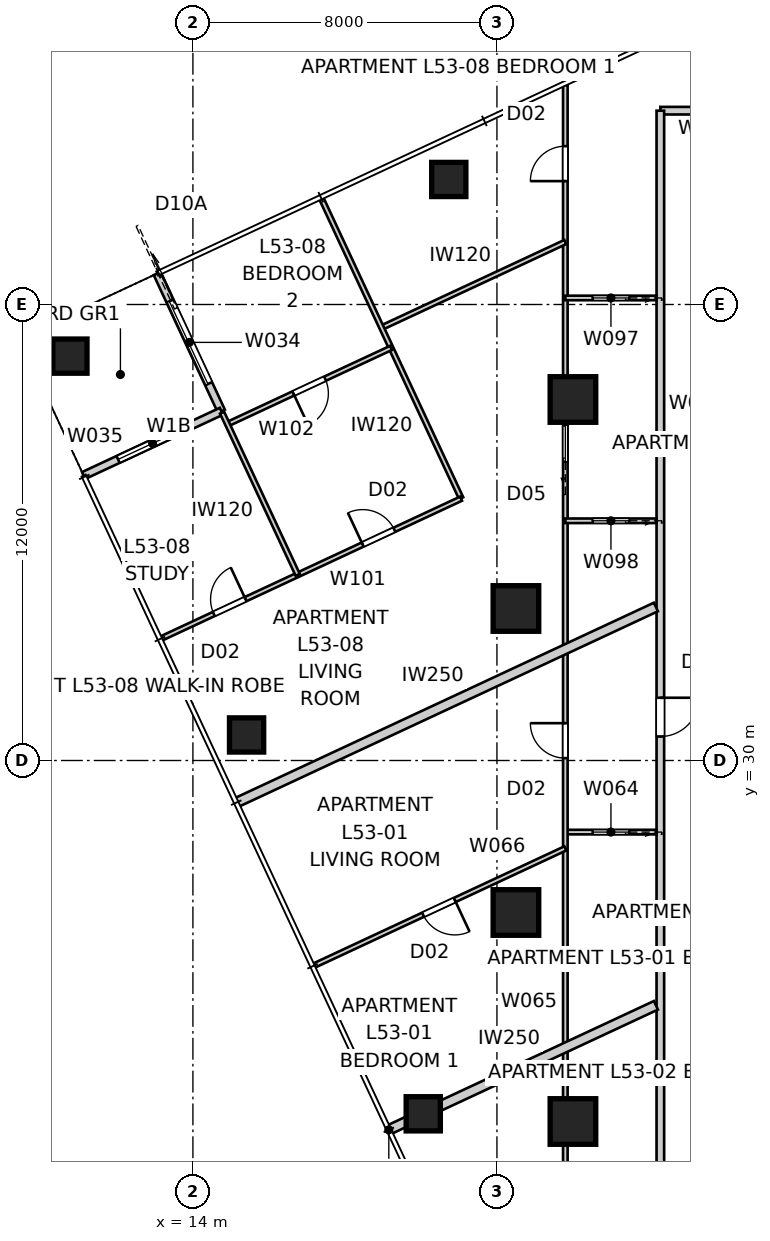
"""IFC4 building model, lengths in metres.
Left out: names, types, materials, properties, quantities, classifications, styles, units other than length and angle.
Written with IfcOpenShell. Run it as: python <this file> out.ifc"""

import sys

from ifc_helpers import new_model, si_unit, direction, frame, frame_2d, origin, origin_2d, place, context, subcontext, project, spatial, rectangle, extrude, element, fill, save


model = new_model("IFC4")
c1 = context("Model", 3, precision=1e-05, world=origin(), true_north=direction((0.0, 1.0)))
c2 = subcontext(c1, "Body", "Model", "MODEL_VIEW")
j1 = project(units=[si_unit("LENGTHUNIT", "METRE"), si_unit("PLANEANGLEUNIT", "RADIAN")], contexts=[c1])
p1 = place(None, origin())
s1 = spatial("IfcSite", under=j1, at=p1, CompositionType="ELEMENT")
p2 = place(p1, origin())
s2 = spatial("IfcBuilding", under=s1, at=p2, CompositionType="ELEMENT")
p3 = place(p2, frame((0.0, 0.0, 193.0)))
s3 = spatial("IfcBuildingStorey", under=s2, at=p3, CompositionType="ELEMENT", Elevation=193.0)
for number, where, z_axis, x_axis in (
    (1, (20.733, 45.29, 0.0), (0.0, 0.0, 1.0), (1.0, 0.0, 0.0)),
    (2, (10.764, 40.641, 0.0), (0.0, 0.0, 1.0), (1.0, 0.0, 0.0)),
    (3, (15.412, 30.672, 0.0), (0.0, 0.0, 1.0), (1.0, 0.0, 0.0)),
    (4, (20.061, 20.702, 0.0), (0.0, 0.0, 1.0), (1.0, 0.0, 0.0)),
):
    element("IfcColumn", number, at=place(p3, frame(where, z_axis=z_axis, x_axis=x_axis)), inside=s3, PredefinedType="COLUMN", context=c2, shape_type="SweptSolid", body=[
        extrude(rectangle(XDim=0.9, YDim=0.9, at=origin_2d()), origin(), (0.0, 0.0, 1.0), 3.4),
    ])
for number, where, z_axis, x_axis in (
    (5, (24.0, 39.5, 0.0), (0.0, 0.0, 1.0), (1.0, 0.0, 0.0)),
    (6, (22.5, 34.0, 0.0), (0.0, 0.0, 1.0), (1.0, 0.0, 0.0)),
    (7, (22.5, 26.0, 0.0), (0.0, 0.0, 1.0), (1.0, 0.0, 0.0)),
    (8, (24.0, 20.5, 0.0), (0.0, 0.0, 1.0), (1.0, 0.0, 0.0)),
):
    element("IfcColumn", number, at=place(p3, frame(where, z_axis=z_axis, x_axis=x_axis)), inside=s3, PredefinedType="COLUMN", context=c2, shape_type="SweptSolid", body=[
        extrude(rectangle(XDim=1.2, YDim=1.2, at=origin_2d()), origin(), (0.0, 0.0, 1.0), 3.4),
    ])
p4 = place(p3, frame((13.06, 42.815, 0.0), z_axis=(0.0, 0.0, 1.0), x_axis=(0.422658246362, -0.906289140828, 0.0)))
e9 = element("IfcWall", 9, at=p4, inside=s3, PredefinedType="SOLIDWALL", context=c2, shape_type="SweptSolid", body=[
    extrude(rectangle(XDim=4.0, YDim=0.2, at=frame_2d((2.0, 0.0))), origin(), (0.0, 0.0, 1.0), 3.25),
])
p5 = place(p4, frame((0.8, 0.0, 0.0)))
e10 = element("IfcOpeningElement", 10, at=p5, cuts=e9, PredefinedType="OPENING", context=c2, shape_type="SweptSolid", body=[
    extrude(rectangle(XDim=2.4, YDim=2.1, at=frame_2d((1.2, 1.05))), frame((0.0, 0.11, 0.0), z_axis=(0.0, -1.0, 0.0), x_axis=(1.0, 0.0, 0.0)), (0.0, 0.0, 1.0), 0.22),
])
p6 = place(p3, frame((14.75, 39.19, 0.0), z_axis=(0.0, 0.0, 1.0), x_axis=(-0.906289140828, -0.422658246362, 0.0)))
e11 = element("IfcWall", 11, at=p6, inside=s3, PredefinedType="SOLIDWALL", context=c2, shape_type="SweptSolid", body=[
    extrude(rectangle(XDim=4.0, YDim=0.2, at=frame_2d((2.0, 0.0))), origin(), (0.0, 0.0, 1.0), 3.25),
])
p7 = place(p6, frame((1.0, 0.0, 0.45)))
e12 = element("IfcOpeningElement", 12, at=p7, cuts=e11, PredefinedType="OPENING", context=c2, shape_type="SweptSolid", body=[
    extrude(rectangle(XDim=2.0, YDim=1.8, at=frame_2d((1.0, 0.9))), frame((0.0, 0.11, 0.0), z_axis=(0.0, -1.0, 0.0), x_axis=(1.0, 0.0, 0.0)), (0.0, 0.0, 1.0), 0.22),
])
p8 = place(p3, frame((33.692, 47.1, 0.0), z_axis=(0.0, 0.0, 1.0), x_axis=(-1.0, 0.0, 0.0)))
e13 = element("IfcWall", 13, at=p8, inside=s3, PredefinedType="PARTITIONING", context=c2, shape_type="SweptSolid", body=[
    extrude(rectangle(XDim=7.392, YDim=0.2, at=frame_2d((3.696, 0.0))), origin(), (0.0, 0.0, 1.0), 3.25),
])
p9 = place(p8, frame((3.957, 0.0, 0.0)))
e14 = element("IfcOpeningElement", 14, at=p9, cuts=e13, PredefinedType="OPENING", context=c2, shape_type="SweptSolid", body=[
    extrude(rectangle(XDim=1.02, YDim=2.34, at=frame_2d((0.51, 1.17))), frame((0.0, 0.11, 0.0), z_axis=(0.0, -1.0, 0.0), x_axis=(1.0, 0.0, 0.0)), (0.0, 0.0, 1.0), 0.22),
])
p10 = place(p3, frame((26.3, 47.1, 0.0), z_axis=(0.0, 0.0, 1.0), x_axis=(0.0, -1.0, 0.0)))
e15 = element("IfcWall", 15, at=p10, inside=s3, PredefinedType="PARTITIONING", context=c2, shape_type="SweptSolid", body=[
    extrude(rectangle(XDim=33.8, YDim=0.2, at=frame_2d((16.9, 0.0))), origin(), (0.0, 0.0, 1.0), 3.25),
])
p11 = place(p10, frame((15.449, 0.0, 0.0)))
e16 = element("IfcOpeningElement", 16, at=p11, cuts=e15, PredefinedType="OPENING", context=c2, shape_type="SweptSolid", body=[
    extrude(rectangle(XDim=1.02, YDim=2.34, at=frame_2d((0.51, 1.17))), frame((0.0, 0.11, 0.0), z_axis=(0.0, -1.0, 0.0), x_axis=(1.0, 0.0, 0.0)), (0.0, 0.0, 1.0), 0.22),
])
p12 = place(p10, frame((30.883, 0.0, 0.0)))
e17 = element("IfcOpeningElement", 17, at=p12, cuts=e15, PredefinedType="OPENING", context=c2, shape_type="SweptSolid", body=[
    extrude(rectangle(XDim=1.02, YDim=2.34, at=frame_2d((0.51, 1.17))), frame((0.0, 0.11, 0.0), z_axis=(0.0, -1.0, 0.0), x_axis=(1.0, 0.0, 0.0)), (0.0, 0.0, 1.0), 0.22),
])
p13 = place(p3, frame((19.155, 20.28, 0.0), z_axis=(0.0, 0.0, 1.0), x_axis=(0.906308569177, 0.422616584432, 0.0)))
e18 = element("IfcWall", 18, at=p13, inside=s3, PredefinedType="PARTITIONING", context=c2, shape_type="SweptSolid", body=[
    extrude(rectangle(XDim=7.755, YDim=0.25, at=frame_2d((3.877, 0.0))), origin(), (0.0, 0.0, 1.0), 3.25),
])
p14 = place(p3, frame((15.14, 28.89, 0.0), z_axis=(0.0, 0.0, 1.0), x_axis=(0.906303906082, 0.422626584374, 0.0)))
e19 = element("IfcWall", 19, at=p14, inside=s3, PredefinedType="PARTITIONING", context=c2, shape_type="SweptSolid", body=[
    extrude(rectangle(XDim=12.185, YDim=0.25, at=frame_2d((6.092, 0.0))), origin(), (0.0, 0.0, 1.0), 3.25),
])
p15 = place(p3, frame((26.2, 28.116, 0.0), z_axis=(0.0, 0.0, 1.0), x_axis=(-1.0, 0.0, 0.0)))
e20 = element("IfcWall", 20, at=p15, inside=s3, PredefinedType="PARTITIONING", context=c2, shape_type="SweptSolid", body=[
    extrude(rectangle(XDim=2.4, YDim=0.12, at=frame_2d((1.2, 0.0))), origin(), (0.0, 0.0, 1.0), 3.25),
])
p16 = place(p15, frame((0.72, 0.0, 0.0)))
e21 = element("IfcOpeningElement", 21, at=p16, cuts=e20, PredefinedType="OPENING", context=c2, shape_type="SweptSolid", body=[
    extrude(rectangle(XDim=0.96, YDim=2.1, at=frame_2d((0.48, 1.05))), frame((0.0, 0.07, 0.0), z_axis=(0.0, -1.0, 0.0), x_axis=(1.0, 0.0, 0.0)), (0.0, 0.0, 1.0), 0.14),
])
p17 = place(p3, frame((23.8, 17.205, 0.0), z_axis=(0.0, 0.0, 1.0), x_axis=(0.0, 1.0, 0.0)))
e22 = element("IfcWall", 22, at=p17, inside=s3, PredefinedType="PARTITIONING", context=c2, shape_type="SweptSolid", body=[
    extrude(rectangle(XDim=30.574, YDim=0.12, at=frame_2d((15.287, 0.0))), origin(), (0.0, 0.0, 1.0), 2.55),
])
p18 = place(p17, frame((12.857, 0.0, 0.0)))
e23 = element("IfcOpeningElement", 23, at=p18, cuts=e22, PredefinedType="OPENING", context=c2, shape_type="SweptSolid", body=[
    extrude(rectangle(XDim=0.92, YDim=2.34, at=frame_2d((0.46, 1.17))), frame((0.0, 0.07, 0.0), z_axis=(0.0, -1.0, 0.0), x_axis=(1.0, 0.0, 0.0)), (0.0, 0.0, 1.0), 0.14),
])
p19 = place(p17, frame((28.042, 0.0, 0.0)))
e24 = element("IfcOpeningElement", 24, at=p19, cuts=e22, PredefinedType="OPENING", context=c2, shape_type="SweptSolid", body=[
    extrude(rectangle(XDim=0.92, YDim=2.34, at=frame_2d((0.46, 1.17))), frame((0.0, 0.07, 0.0), z_axis=(0.0, -1.0, 0.0), x_axis=(1.0, 0.0, 0.0)), (0.0, 0.0, 1.0), 0.14),
])
p20 = place(p17, frame((20.655, 0.0, 0.0)))
e25 = element("IfcOpeningElement", 25, at=p20, cuts=e22, PredefinedType="OPENING", context=c2, shape_type="SweptSolid", body=[
    extrude(rectangle(XDim=0.96, YDim=2.1, at=frame_2d((0.48, 1.05))), frame((0.0, 0.07, 0.0), z_axis=(0.0, -1.0, 0.0), x_axis=(1.0, 0.0, 0.0)), (0.0, 0.0, 1.0), 0.14),
])
p21 = place(p3, frame((23.8, 27.687, 0.0), z_axis=(0.0, 0.0, 1.0), x_axis=(-0.906306986906, -0.422619977621, 0.0)))
e26 = element("IfcWall", 26, at=p21, inside=s3, PredefinedType="PARTITIONING", context=c2, shape_type="SweptSolid", body=[
    extrude(rectangle(XDim=7.3, YDim=0.12, at=frame_2d((3.65, 0.0))), origin(), (0.0, 0.0, 1.0), 3.25),
])
p22 = place(p21, frame((3.21, 0.0, 0.0)))
e27 = element("IfcOpeningElement", 27, at=p22, cuts=e26, PredefinedType="OPENING", context=c2, shape_type="SweptSolid", body=[
    extrude(rectangle(XDim=0.92, YDim=2.34, at=frame_2d((0.46, 1.17))), frame((0.0, 0.07, 0.0), z_axis=(0.0, -1.0, 0.0), x_axis=(1.0, 0.0, 0.0)), (0.0, 0.0, 1.0), 0.14),
])
p23 = place(p3, frame((26.2, 42.172, 0.0), z_axis=(0.0, 0.0, 1.0), x_axis=(-1.0, 0.0, 0.0)))
e28 = element("IfcWall", 28, at=p23, inside=s3, PredefinedType="PARTITIONING", context=c2, shape_type="SweptSolid", body=[
    extrude(rectangle(XDim=2.4, YDim=0.12, at=frame_2d((1.2, 0.0))), origin(), (0.0, 0.0, 1.0), 3.25),
])
p24 = place(p23, frame((0.72, 0.0, 0.0)))
e29 = element("IfcOpeningElement", 29, at=p24, cuts=e28, PredefinedType="OPENING", context=c2, shape_type="SweptSolid", body=[
    extrude(rectangle(XDim=0.96, YDim=2.1, at=frame_2d((0.48, 1.05))), frame((0.0, 0.07, 0.0), z_axis=(0.0, -1.0, 0.0), x_axis=(1.0, 0.0, 0.0)), (0.0, 0.0, 1.0), 0.14),
])
p25 = place(p3, frame((26.2, 36.308, 0.0), z_axis=(0.0, 0.0, 1.0), x_axis=(-1.0, 0.0, 0.0)))
e30 = element("IfcWall", 30, at=p25, inside=s3, PredefinedType="PARTITIONING", context=c2, shape_type="SweptSolid", body=[
    extrude(rectangle(XDim=2.4, YDim=0.12, at=frame_2d((1.2, 0.0))), origin(), (0.0, 0.0, 1.0), 3.25),
])
p26 = place(p25, frame((0.72, 0.0, 0.0)))
e31 = element("IfcOpeningElement", 31, at=p26, cuts=e30, PredefinedType="OPENING", context=c2, shape_type="SweptSolid", body=[
    extrude(rectangle(XDim=0.96, YDim=2.1, at=frame_2d((0.48, 1.05))), frame((0.0, 0.07, 0.0), z_axis=(0.0, -1.0, 0.0), x_axis=(1.0, 0.0, 0.0)), (0.0, 0.0, 1.0), 0.14),
])
p27 = place(p3, frame((18.965, 41.391, 0.0), z_axis=(0.0, 0.0, 1.0), x_axis=(0.906312880264, 0.422607339108, 0.0)))
e32 = element("IfcWall", 32, at=p27, inside=s3, PredefinedType="PARTITIONING", context=c2, shape_type="SweptSolid", body=[
    extrude(rectangle(XDim=5.334, YDim=0.12, at=frame_2d((2.667, 0.0))), origin(), (0.0, 0.0, 1.0), 3.25),
])
p28 = place(p3, frame((21.059, 36.902, 0.0), z_axis=(0.0, 0.0, 1.0), x_axis=(-0.422610460864, 0.906311424604, 0.0)))
e33 = element("IfcWall", 33, at=p28, inside=s3, PredefinedType="PARTITIONING", context=c2, shape_type="SweptSolid", body=[
    extrude(rectangle(XDim=8.7, YDim=0.12, at=frame_2d((4.35, 0.0))), origin(), (0.0, 0.0, 1.0), 3.25),
])
p29 = place(p3, frame((13.169, 33.211, 0.0), z_axis=(0.0, 0.0, 1.0), x_axis=(0.906281301188, 0.422675056181, 0.0)))
e34 = element("IfcWall", 34, at=p29, inside=s3, PredefinedType="PARTITIONING", context=c2, shape_type="SweptSolid", body=[
    extrude(rectangle(XDim=8.703, YDim=0.12, at=frame_2d((4.352, 0.0))), origin(), (0.0, 0.0, 1.0), 3.25),
])
p30 = place(p29, frame((5.846, 0.0, 0.0)))
e35 = element("IfcOpeningElement", 35, at=p30, cuts=e34, PredefinedType="OPENING", context=c2, shape_type="SweptSolid", body=[
    extrude(rectangle(XDim=0.92, YDim=2.34, at=frame_2d((0.46, 1.17))), frame((0.0, 0.07, 0.0), z_axis=(0.0, -1.0, 0.0), x_axis=(1.0, 0.0, 0.0)), (0.0, 0.0, 1.0), 0.14),
])
p31 = place(p29, frame((1.525, 0.0, 0.0)))
e36 = element("IfcOpeningElement", 36, at=p31, cuts=e34, PredefinedType="OPENING", context=c2, shape_type="SweptSolid", body=[
    extrude(rectangle(XDim=0.92, YDim=2.34, at=frame_2d((0.46, 1.17))), frame((0.0, 0.07, 0.0), z_axis=(0.0, -1.0, 0.0), x_axis=(1.0, 0.0, 0.0)), (0.0, 0.0, 1.0), 0.14),
])
p32 = place(p3, frame((19.214, 40.858, 0.0), z_axis=(0.0, 0.0, 1.0), x_axis=(-0.906296032609, -0.422643468278, 0.0)))
e37 = element("IfcWall", 37, at=p32, inside=s3, PredefinedType="PARTITIONING", context=c2, shape_type="SweptSolid", body=[
    extrude(rectangle(XDim=4.75, YDim=0.12, at=frame_2d((2.375, 0.0))), origin(), (0.0, 0.0, 1.0), 3.25),
])
p33 = place(p32, frame((1.915, 0.0, 0.0)))
e38 = element("IfcOpeningElement", 38, at=p33, cuts=e37, PredefinedType="OPENING", context=c2, shape_type="SweptSolid", body=[
    extrude(rectangle(XDim=0.92, YDim=2.34, at=frame_2d((0.46, 1.17))), frame((0.0, 0.07, 0.0), z_axis=(0.0, -1.0, 0.0), x_axis=(1.0, 0.0, 0.0)), (0.0, 0.0, 1.0), 0.14),
])
p34 = place(p3, frame((16.758, 34.885, 0.0), z_axis=(0.0, 0.0, 1.0), x_axis=(-0.422601682441, 0.906315517906, 0.0)))
e39 = element("IfcWall", 39, at=p34, inside=s3, PredefinedType="PARTITIONING", context=c2, shape_type="SweptSolid", body=[
    extrude(rectangle(XDim=4.71, YDim=0.12, at=frame_2d((2.355, 0.0))), origin(), (0.0, 0.0, 1.0), 3.25),
])
p35 = place(p5, origin())
e40 = element("IfcDoor", 40, at=p35, inside=s3, OperationType="SLIDING_TO_LEFT", PredefinedType="DOOR", context=c2, shape_type="SweptSolid", body=[
    extrude(rectangle(XDim=2.4, YDim=2.1, at=frame_2d((1.2, 1.05))), frame((0.0, 0.025, 0.0), z_axis=(0.0, -1.0, 0.0), x_axis=(1.0, 0.0, 0.0)), (0.0, 0.0, 1.0), 0.05),
])
fill(e10, e40)
p36 = place(p7, origin())
e41 = element("IfcWindow", 41, at=p36, inside=s3, PartitioningType="SINGLE_PANEL", PredefinedType="WINDOW", context=c2, shape_type="SweptSolid", body=[
    extrude(rectangle(XDim=2.0, YDim=1.8, at=frame_2d((1.0, 0.9))), frame((0.0, 0.03, 0.0), z_axis=(0.0, -1.0, 0.0), x_axis=(1.0, 0.0, 0.0)), (0.0, 0.0, 1.0), 0.06),
])
fill(e12, e41)
p37 = place(p11, origin())
e42 = element("IfcDoor", 42, at=p37, inside=s3, OperationType="SINGLE_SWING_LEFT", PredefinedType="DOOR", context=c2, shape_type="SweptSolid", body=[
    extrude(rectangle(XDim=1.02, YDim=2.34, at=frame_2d((0.51, 1.17))), frame((0.0, 0.025, 0.0), z_axis=(0.0, -1.0, 0.0), x_axis=(1.0, 0.0, 0.0)), (0.0, 0.0, 1.0), 0.05),
])
fill(e16, e42)
p38 = place(p18, origin())
e43 = element("IfcDoor", 43, at=p38, inside=s3, OperationType="SINGLE_SWING_RIGHT", PredefinedType="DOOR", context=c2, shape_type="SweptSolid", body=[
    extrude(rectangle(XDim=0.92, YDim=2.34, at=frame_2d((0.46, 1.17))), frame((0.0, 0.025, 0.0), z_axis=(0.0, -1.0, 0.0), x_axis=(1.0, 0.0, 0.0)), (0.0, 0.0, 1.0), 0.05),
])
fill(e23, e43)
p39 = place(p16, origin())
e44 = element("IfcDoor", 44, at=p39, inside=s3, OperationType="SLIDING_TO_LEFT", PredefinedType="DOOR", context=c2, shape_type="SweptSolid", body=[
    extrude(rectangle(XDim=0.96, YDim=2.1, at=frame_2d((0.48, 1.05))), frame((0.0, 0.025, 0.0), z_axis=(0.0, -1.0, 0.0), x_axis=(1.0, 0.0, 0.0)), (0.0, 0.0, 1.0), 0.05),
])
fill(e21, e44)
p40 = place(p19, origin())
e45 = element("IfcDoor", 45, at=p40, inside=s3, OperationType="SINGLE_SWING_LEFT", PredefinedType="DOOR", context=c2, shape_type="SweptSolid", body=[
    extrude(rectangle(XDim=0.92, YDim=2.34, at=frame_2d((0.46, 1.17))), frame((0.0, 0.025, 0.0), z_axis=(0.0, -1.0, 0.0), x_axis=(1.0, 0.0, 0.0)), (0.0, 0.0, 1.0), 0.05),
])
fill(e24, e45)
p41 = place(p24, origin())
e46 = element("IfcDoor", 46, at=p41, inside=s3, OperationType="SLIDING_TO_LEFT", PredefinedType="DOOR", context=c2, shape_type="SweptSolid", body=[
    extrude(rectangle(XDim=0.96, YDim=2.1, at=frame_2d((0.48, 1.05))), frame((0.0, 0.025, 0.0), z_axis=(0.0, -1.0, 0.0), x_axis=(1.0, 0.0, 0.0)), (0.0, 0.0, 1.0), 0.05),
])
fill(e29, e46)
p42 = place(p22, origin())
e47 = element("IfcDoor", 47, at=p42, inside=s3, OperationType="SINGLE_SWING_LEFT", PredefinedType="DOOR", context=c2, shape_type="SweptSolid", body=[
    extrude(rectangle(XDim=0.92, YDim=2.34, at=frame_2d((0.46, 1.17))), frame((0.0, 0.025, 0.0), z_axis=(0.0, -1.0, 0.0), x_axis=(1.0, 0.0, 0.0)), (0.0, 0.0, 1.0), 0.05),
])
fill(e27, e47)
p43 = place(p20, origin())
e48 = element("IfcDoor", 48, at=p43, inside=s3, OperationType="SLIDING_TO_LEFT", PredefinedType="DOOR", context=c2, shape_type="SweptSolid", body=[
    extrude(rectangle(XDim=0.96, YDim=2.1, at=frame_2d((0.48, 1.05))), frame((0.0, 0.025, 0.0), z_axis=(0.0, -1.0, 0.0), x_axis=(1.0, 0.0, 0.0)), (0.0, 0.0, 1.0), 0.05),
])
fill(e25, e48)
p44 = place(p26, origin())
e49 = element("IfcDoor", 49, at=p44, inside=s3, OperationType="SLIDING_TO_LEFT", PredefinedType="DOOR", context=c2, shape_type="SweptSolid", body=[
    extrude(rectangle(XDim=0.96, YDim=2.1, at=frame_2d((0.48, 1.05))), frame((0.0, 0.025, 0.0), z_axis=(0.0, -1.0, 0.0), x_axis=(1.0, 0.0, 0.0)), (0.0, 0.0, 1.0), 0.05),
])
fill(e31, e49)
p45 = place(p30, origin())
e50 = element("IfcDoor", 50, at=p45, inside=s3, OperationType="SINGLE_SWING_LEFT", PredefinedType="DOOR", context=c2, shape_type="SweptSolid", body=[
    extrude(rectangle(XDim=0.92, YDim=2.34, at=frame_2d((0.46, 1.17))), frame((0.0, 0.025, 0.0), z_axis=(0.0, -1.0, 0.0), x_axis=(1.0, 0.0, 0.0)), (0.0, 0.0, 1.0), 0.05),
])
fill(e35, e50)
p46 = place(p31, origin())
e51 = element("IfcDoor", 51, at=p46, inside=s3, OperationType="SINGLE_SWING_RIGHT", PredefinedType="DOOR", context=c2, shape_type="SweptSolid", body=[
    extrude(rectangle(XDim=0.92, YDim=2.34, at=frame_2d((0.46, 1.17))), frame((0.0, 0.025, 0.0), z_axis=(0.0, -1.0, 0.0), x_axis=(1.0, 0.0, 0.0)), (0.0, 0.0, 1.0), 0.05),
])
fill(e36, e51)
p47 = place(p33, origin())
e52 = element("IfcDoor", 52, at=p47, inside=s3, OperationType="SINGLE_SWING_RIGHT", PredefinedType="DOOR", context=c2, shape_type="SweptSolid", body=[
    extrude(rectangle(XDim=0.92, YDim=2.34, at=frame_2d((0.46, 1.17))), frame((0.0, 0.025, 0.0), z_axis=(0.0, -1.0, 0.0), x_axis=(1.0, 0.0, 0.0)), (0.0, 0.0, 1.0), 0.05),
])
fill(e38, e52)
save(model, sys.argv[1])
